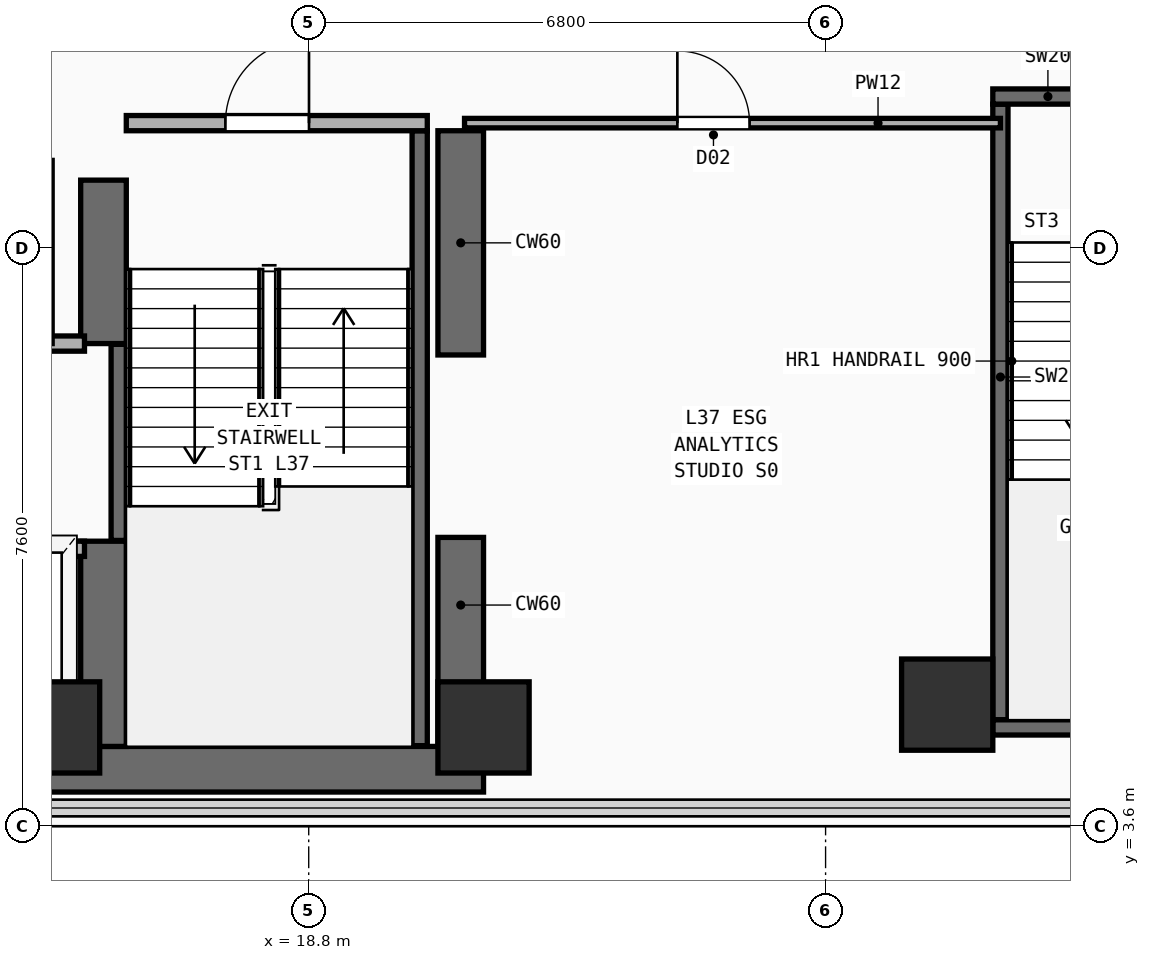
"""IFC4 building model, lengths in metres.
Left out: names, types, materials, properties, quantities, classifications, styles, units other than length and angle.
Written with IfcOpenShell. Run it as: python <this file> out.ifc"""

import sys

from ifc_helpers import new_model, si_unit, direction, frame, frame_2d, origin, origin_2d, place, context, subcontext, project, spatial, rectangle, extrude, element, fill, save


model = new_model("IFC4")
c1 = context("Model", 3, precision=1e-05, world=origin(), true_north=direction((0.0, 1.0)))
c2 = subcontext(c1, "Body", "Model", "MODEL_VIEW")
j1 = project(units=[si_unit("LENGTHUNIT", "METRE"), si_unit("PLANEANGLEUNIT", "RADIAN")], contexts=[c1])
p1 = place(None, origin())
s1 = spatial("IfcSite", under=j1, at=p1, CompositionType="ELEMENT")
p2 = place(p1, origin())
s2 = spatial("IfcBuilding", under=s1, at=p2, CompositionType="ELEMENT")
p3 = place(p2, frame((0.0, 0.0, 146.2)))
s3 = spatial("IfcBuildingStorey", under=s2, at=p3, CompositionType="ELEMENT", Elevation=146.2)
p4 = place(p3, frame((7.15, 4.35, 0.0), z_axis=(0.0, 0.0, 1.0), x_axis=(1.0, 0.0, 0.0)))
e1 = element("IfcWall", 1, at=p4, inside=s3, PredefinedType="SHEAR", context=c2, shape_type="SweptSolid", body=[
    extrude(rectangle(XDim=13.95, YDim=0.6, at=frame_2d((6.975, 0.0))), origin(), (0.0, 0.0, 1.0), 3.56),
])
p5 = place(p3, frame((20.8, 4.65, 0.0), z_axis=(0.0, 0.0, 1.0), x_axis=(0.0, 1.0, 0.0)))
e2 = element("IfcWall", 2, at=p5, inside=s3, PredefinedType="SHEAR", context=c2, shape_type="SweptSolid", body=[
    extrude(rectangle(XDim=2.75, YDim=0.6, at=frame_2d((1.375, 0.0))), origin(), (0.0, 0.0, 1.0), 3.56),
])
p6 = place(p3, frame((20.8, 9.8, 0.0), z_axis=(0.0, 0.0, 1.0), x_axis=(0.0, 1.0, 0.0)))
e3 = element("IfcWall", 3, at=p6, inside=s3, PredefinedType="SHEAR", context=c2, shape_type="SweptSolid", body=[
    extrude(rectangle(XDim=2.95, YDim=0.6, at=frame_2d((1.475, 0.0))), origin(), (0.0, 0.0, 1.0), 3.56),
])
p7 = place(p3, frame((16.1, 4.65, 0.0), z_axis=(0.0, 0.0, 1.0), x_axis=(0.0, 1.0, 0.0)))
e4 = element("IfcWall", 4, at=p7, inside=s3, PredefinedType="SHEAR", context=c2, shape_type="SweptSolid", body=[
    extrude(rectangle(XDim=2.7, YDim=0.6, at=frame_2d((1.35, 0.0))), origin(), (0.0, 0.0, 1.0), 3.56),
])
p8 = place(p3, frame((16.1, 9.95, 0.0), z_axis=(0.0, 0.0, 1.0), x_axis=(0.0, 1.0, 0.0)))
e5 = element("IfcWall", 5, at=p8, inside=s3, PredefinedType="SHEAR", context=c2, shape_type="SweptSolid", body=[
    extrude(rectangle(XDim=2.15, YDim=0.6, at=frame_2d((1.075, 0.0))), origin(), (0.0, 0.0, 1.0), 3.56),
])
for number, where, z_axis, x_axis in (
    (6, (15.45, 4.9, 0.0), (0.0, 0.0, 1.0), (1.0, 0.0, 0.0)),
    (7, (21.1, 4.9, 0.0), (0.0, 0.0, 1.0), (1.0, 0.0, 0.0)),
    (8, (27.2, 5.2, 0.0), (0.0, 0.0, 1.0), (1.0, 0.0, 0.0)),
):
    element("IfcColumn", number, at=place(p3, frame(where, z_axis=z_axis, x_axis=x_axis)), inside=s3, PredefinedType="COLUMN", context=c2, shape_type="SweptSolid", body=[
        extrude(rectangle(XDim=1.2, YDim=1.2, at=origin_2d()), origin(), (0.0, 0.0, 1.0), 3.56),
    ])
p9 = place(p3, frame((16.3, 7.36, 0.0), z_axis=(0.0, 0.0, 1.0), x_axis=(0.0, 1.0, 0.0)))
e9 = element("IfcWall", 9, at=p9, inside=s3, PredefinedType="SHEAR", context=c2, shape_type="SweptSolid", body=[
    extrude(rectangle(XDim=2.58, YDim=0.2, at=frame_2d((1.29, 0.0))), origin(), (0.0, 0.0, 1.0), 3.56),
])
p10 = place(p3, frame((20.26, 4.66, 0.0), z_axis=(0.0, 0.0, 1.0), x_axis=(0.0, 1.0, 0.0)))
e10 = element("IfcWall", 10, at=p10, inside=s3, PredefinedType="SHEAR", context=c2, shape_type="SweptSolid", body=[
    extrude(rectangle(XDim=8.09, YDim=0.2, at=frame_2d((4.045, 0.0))), origin(), (0.0, 0.0, 1.0), 3.56),
])
p11 = place(p3, frame((16.4, 12.85, 0.0), z_axis=(0.0, 0.0, 1.0), x_axis=(1.0, 0.0, 0.0)))
e11 = element("IfcWall", 11, at=p11, inside=s3, PredefinedType="PARTITIONING", context=c2, shape_type="SweptSolid", body=[
    extrude(rectangle(XDim=3.96, YDim=0.2, at=frame_2d((1.98, 0.0))), origin(), (0.0, 0.0, 1.0), 3.56),
])
p12 = place(p11, frame((1.304, 0.0, 0.0)))
e12 = element("IfcOpeningElement", 12, at=p12, cuts=e11, PredefinedType="OPENING", context=c2, shape_type="SweptSolid", body=[
    extrude(rectangle(XDim=1.1, YDim=2.2, at=frame_2d((0.55, 1.1))), frame((0.0, 0.11, 0.0), z_axis=(0.0, -1.0, 0.0), x_axis=(1.0, 0.0, 0.0)), (0.0, 0.0, 1.0), 0.22),
])
p13 = place(p3, frame((27.9, 5.0, 0.0), z_axis=(0.0, 0.0, 1.0), x_axis=(0.0, 1.0, 0.0)))
e13 = element("IfcWall", 13, at=p13, inside=s3, PredefinedType="SHEAR", context=c2, shape_type="SweptSolid", body=[
    extrude(rectangle(XDim=8.1, YDim=0.2, at=frame_2d((4.05, 0.0))), origin(), (0.0, 0.0, 1.0), 3.56),
])
p14 = place(p3, frame((27.8, 4.9, 0.0), z_axis=(0.0, 0.0, 1.0), x_axis=(1.0, 0.0, 0.0)))
e14 = element("IfcWall", 14, at=p14, inside=s3, PredefinedType="SHEAR", context=c2, shape_type="SweptSolid", body=[
    extrude(rectangle(XDim=4.16, YDim=0.2, at=frame_2d((2.08, 0.0))), origin(), (0.0, 0.0, 1.0), 3.56),
])
p15 = place(p3, frame((27.8, 13.2, 0.0), z_axis=(0.0, 0.0, 1.0), x_axis=(1.0, 0.0, 0.0)))
e15 = element("IfcWall", 15, at=p15, inside=s3, PredefinedType="SHEAR", context=c2, shape_type="SweptSolid", body=[
    extrude(rectangle(XDim=4.16, YDim=0.2, at=frame_2d((2.08, 0.0))), origin(), (0.0, 0.0, 1.0), 3.56),
])
p16 = place(p15, frame((1.53, 0.0, 0.0)))
e16 = element("IfcOpeningElement", 16, at=p16, cuts=e15, PredefinedType="OPENING", context=c2, shape_type="SweptSolid", body=[
    extrude(rectangle(XDim=1.1, YDim=2.2, at=frame_2d((0.55, 1.1))), frame((0.0, 0.11, 0.0), z_axis=(0.0, -1.0, 0.0), x_axis=(1.0, 0.0, 0.0)), (0.0, 0.0, 1.0), 0.22),
])
p17 = place(p3, frame((7.5, 7.25, 0.0), z_axis=(0.0, 0.0, 1.0), x_axis=(1.0, 0.0, 0.0)))
e17 = element("IfcWall", 17, at=p17, inside=s3, PredefinedType="PARTITIONING", context=c2, shape_type="SweptSolid", body=[
    extrude(rectangle(XDim=8.35, YDim=0.2, at=frame_2d((4.175, 0.0))), origin(), (0.0, 0.0, 1.0), 3.56),
])
p18 = place(p17, frame((0.53, 0.0, 0.0)))
e18 = element("IfcOpeningElement", 18, at=p18, cuts=e17, PredefinedType="OPENING", context=c2, shape_type="SweptSolid", body=[
    extrude(rectangle(XDim=1.1, YDim=2.2, at=frame_2d((0.55, 1.1))), frame((0.0, 0.11, 0.0), z_axis=(0.0, -1.0, 0.0), x_axis=(1.0, 0.0, 0.0)), (0.0, 0.0, 1.0), 0.22),
])
p19 = place(p17, frame((2.37, 0.0, 0.0)))
e19 = element("IfcOpeningElement", 19, at=p19, cuts=e17, PredefinedType="OPENING", context=c2, shape_type="SweptSolid", body=[
    extrude(rectangle(XDim=1.1, YDim=2.2, at=frame_2d((0.55, 1.1))), frame((0.0, 0.11, 0.0), z_axis=(0.0, -1.0, 0.0), x_axis=(1.0, 0.0, 0.0)), (0.0, 0.0, 1.0), 0.22),
])
p20 = place(p17, frame((4.33, 0.0, 0.0)))
e20 = element("IfcOpeningElement", 20, at=p20, cuts=e17, PredefinedType="OPENING", context=c2, shape_type="SweptSolid", body=[
    extrude(rectangle(XDim=1.1, YDim=2.2, at=frame_2d((0.55, 1.1))), frame((0.0, 0.11, 0.0), z_axis=(0.0, -1.0, 0.0), x_axis=(1.0, 0.0, 0.0)), (0.0, 0.0, 1.0), 0.22),
])
p21 = place(p17, frame((6.5, 0.0, 0.0)))
e21 = element("IfcOpeningElement", 21, at=p21, cuts=e17, PredefinedType="OPENING", context=c2, shape_type="SweptSolid", body=[
    extrude(rectangle(XDim=1.1, YDim=2.2, at=frame_2d((0.55, 1.1))), frame((0.0, 0.11, 0.0), z_axis=(0.0, -1.0, 0.0), x_axis=(1.0, 0.0, 0.0)), (0.0, 0.0, 1.0), 0.22),
])
p22 = place(p3, frame((7.5, 9.95, 0.0), z_axis=(0.0, 0.0, 1.0), x_axis=(1.0, 0.0, 0.0)))
e22 = element("IfcWall", 22, at=p22, inside=s3, PredefinedType="PARTITIONING", context=c2, shape_type="SweptSolid", body=[
    extrude(rectangle(XDim=8.35, YDim=0.2, at=frame_2d((4.175, 0.0))), origin(), (0.0, 0.0, 1.0), 3.56),
])
p23 = place(p3, frame((15.35, 9.95, 0.0), z_axis=(0.0, 0.0, 1.0), x_axis=(0.0, 1.0, 0.0)))
e23 = element("IfcWall", 23, at=p23, inside=s3, PredefinedType="PARTITIONING", context=c2, shape_type="SweptSolid", body=[
    extrude(rectangle(XDim=2.41, YDim=0.15, at=frame_2d((1.205, 0.0))), origin(), (0.0, 0.0, 1.0), 3.56),
])
p24 = place(p3, frame((20.85, 12.85, 0.0), z_axis=(0.0, 0.0, 1.0), x_axis=(1.0, 0.0, 0.0)))
e24 = element("IfcWall", 24, at=p24, inside=s3, PredefinedType="PARTITIONING", context=c2, shape_type="SweptSolid", body=[
    extrude(rectangle(XDim=7.05, YDim=0.125, at=frame_2d((3.525, 0.0))), origin(), (0.0, 0.0, 1.0), 3.56),
])
p25 = place(p24, frame((2.8, 0.0, 0.0)))
e25 = element("IfcOpeningElement", 25, at=p25, cuts=e24, PredefinedType="OPENING", context=c2, shape_type="SweptSolid", body=[
    extrude(rectangle(XDim=0.95, YDim=2.15, at=frame_2d((0.475, 1.075))), frame((0.0, 0.073, 0.0), z_axis=(0.0, -1.0, 0.0), x_axis=(1.0, 0.0, 0.0)), (0.0, 0.0, 1.0), 0.145),
])
p26 = place(p12, frame((1.1, 0.0, 0.0), z_axis=(0.0, 0.0, 1.0), x_axis=(-1.0, 0.0, 0.0)))
e26 = element("IfcDoor", 26, at=p26, inside=s3, OperationType="SINGLE_SWING_LEFT", PredefinedType="DOOR", context=c2, shape_type="SweptSolid", body=[
    extrude(rectangle(XDim=1.1, YDim=2.2, at=frame_2d((0.55, 1.1))), frame((0.0, 0.025, 0.0), z_axis=(0.0, -1.0, 0.0), x_axis=(1.0, 0.0, 0.0)), (0.0, 0.0, 1.0), 0.05),
])
fill(e12, e26)
p27 = place(p25, origin())
e27 = element("IfcDoor", 27, at=p27, inside=s3, OperationType="SINGLE_SWING_LEFT", PredefinedType="DOOR", context=c2, shape_type="SweptSolid", body=[
    extrude(rectangle(XDim=0.95, YDim=2.15, at=frame_2d((0.475, 1.075))), frame((0.0, 0.025, 0.0), z_axis=(0.0, -1.0, 0.0), x_axis=(1.0, 0.0, 0.0)), (0.0, 0.0, 1.0), 0.05),
])
fill(e25, e27)
save(model, sys.argv[1])
